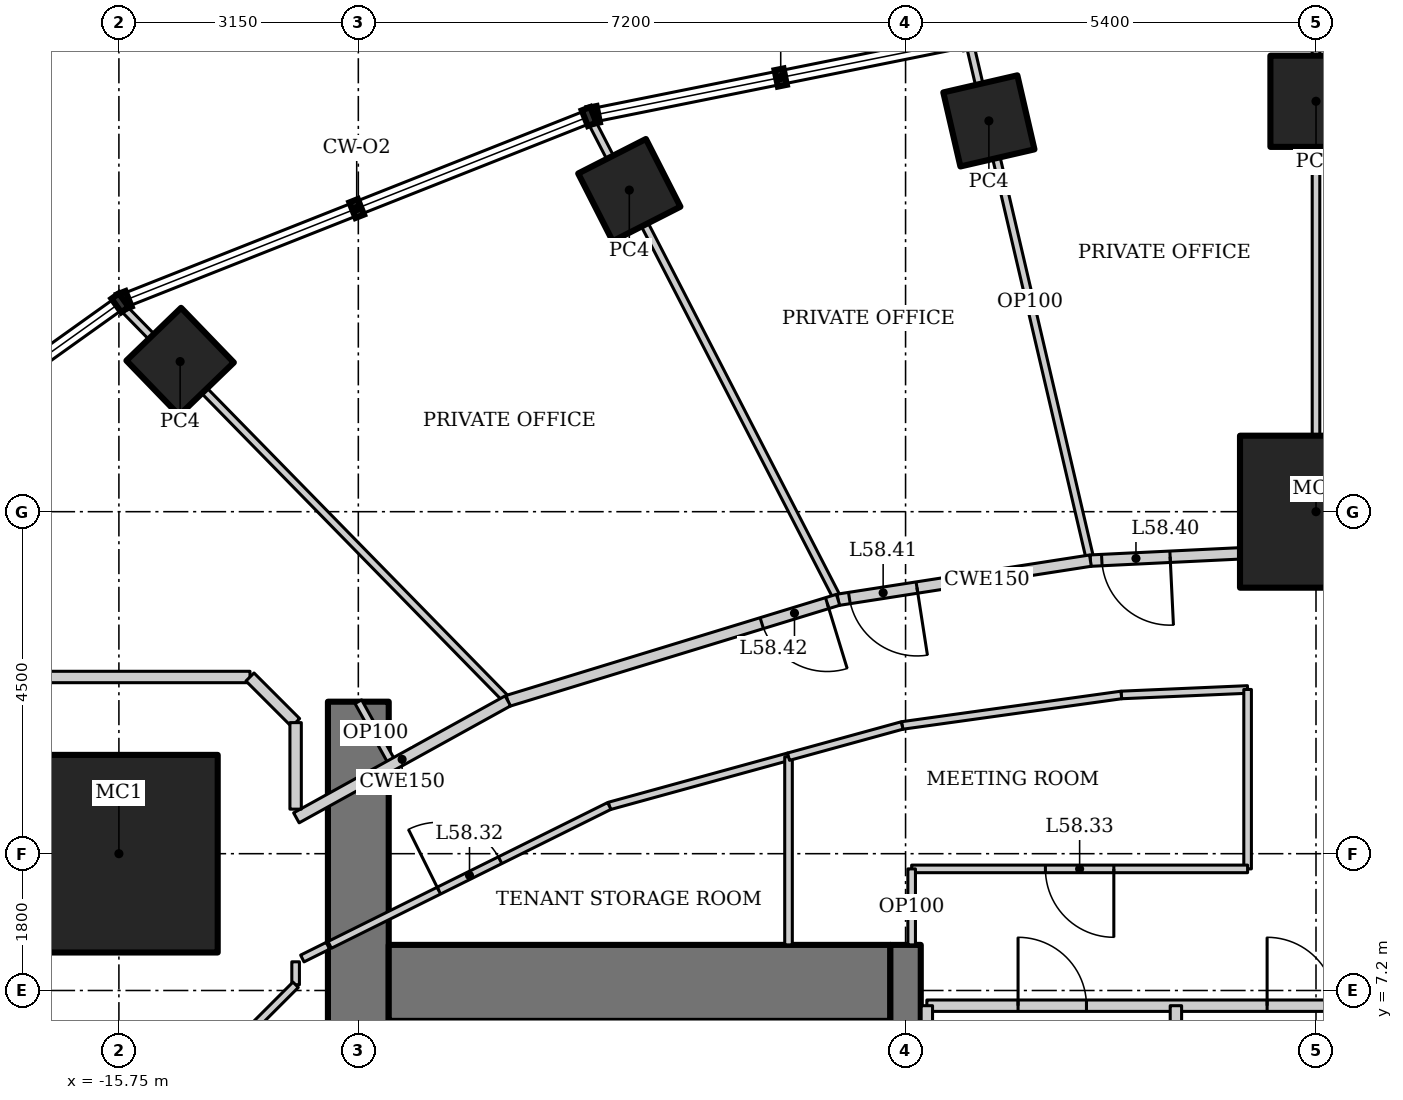
"""IFC4 building model, lengths in metres.
Left out: names, types, materials, properties, quantities, classifications, styles, units other than length and angle.
Written with IfcOpenShell. Run it as: python <this file> out.ifc"""

import sys

from ifc_helpers import new_model, si_unit, direction, frame, frame_2d, origin, origin_2d, place, context, subcontext, project, spatial, rectangle, hollow_rectangle, extrude, element, fill, save


model = new_model("IFC4")
c1 = context("Model", 3, precision=1e-05, world=origin(), true_north=direction((0.0, 1.0)))
c2 = subcontext(c1, "Body", "Model", "MODEL_VIEW")
j1 = project(units=[si_unit("LENGTHUNIT", "METRE"), si_unit("PLANEANGLEUNIT", "RADIAN")], contexts=[c1])
p1 = place(None, origin())
s1 = spatial("IfcSite", under=j1, at=p1, CompositionType="ELEMENT")
p2 = place(p1, origin())
s2 = spatial("IfcBuilding", under=s1, at=p2, CompositionType="ELEMENT")
p3 = place(p2, frame((0.0, 0.0, 249.4)))
s3 = spatial("IfcBuildingStorey", under=s2, at=p3, CompositionType="ELEMENT", Elevation=249.4)
p4 = place(p3, frame((0.0, 13.5, 0.0), z_axis=(0.0, 0.0, 1.0), x_axis=(1.0, 0.0, 0.0)))
e1 = element("IfcColumn", 1, at=p4, inside=s3, PredefinedType="COLUMN", context=c2, shape_type="SweptSolid", body=[
    extrude(hollow_rectangle(XDim=2.0, YDim=2.0, WallThickness=0.17, at=origin_2d()), origin(), (0.0, 0.0, 1.0), 4.2),
])
p5 = place(p3, frame((-15.75, 9.0, 0.0), z_axis=(0.0, 0.0, 1.0), x_axis=(1.0, 0.0, 0.0)))
e2 = element("IfcColumn", 2, at=p5, inside=s3, PredefinedType="COLUMN", context=c2, shape_type="SweptSolid", body=[
    extrude(hollow_rectangle(XDim=2.6, YDim=2.6, WallThickness=0.13, at=origin_2d()), origin(), (0.0, 0.0, 1.0), 4.2),
])
p6 = place(p3, frame((0.0, 18.9, 0.0), z_axis=(0.0, 0.0, 1.0), x_axis=(1.0, 0.0, 0.0)))
e3 = element("IfcColumn", 3, at=p6, inside=s3, PredefinedType="COLUMN", context=c2, shape_type="SweptSolid", body=[
    extrude(hollow_rectangle(XDim=1.2, YDim=1.2, WallThickness=0.1, at=origin_2d()), origin(), (0.0, 0.0, 1.0), 4.2),
])
for number, where, z_axis, x_axis in (
    (4, (-4.304, 18.642, 0.0), (0.0, 0.0, 1.0), (0.974, 0.225, 0.0)),
    (5, (-9.035, 17.731, 0.0), (0.0, 0.0, 1.0), (0.891, 0.454, 0.0)),
    (6, (-14.944, 15.475, 0.0), (0.0, 0.0, 1.0), (0.719, 0.695, 0.0)),
):
    element("IfcColumn", number, at=place(p3, frame(where, z_axis=z_axis, x_axis=x_axis)), inside=s3, PredefinedType="COLUMN", context=c2, shape_type="SweptSolid", body=[
        extrude(hollow_rectangle(XDim=1.0, YDim=1.0, WallThickness=0.08, at=origin_2d()), origin(), (0.0, 0.0, 1.0), 4.2),
    ])
p7 = place(p3, frame((-12.6, 11.0, 0.0), z_axis=(0.0, 0.0, 1.0), x_axis=(0.0, -1.0, 0.0)))
e7 = element("IfcWall", 7, at=p7, inside=s3, PredefinedType="SHEAR", context=c2, shape_type="SweptSolid", body=[
    extrude(rectangle(XDim=22.0, YDim=0.8, at=frame_2d((11.0, 0.0))), origin(), (0.0, 0.0, 1.0), 4.2),
])
p8 = place(p7, frame((10.1, 0.0, 0.0)))
e8 = element("IfcOpeningElement", 8, at=p8, cuts=e7, PredefinedType="OPENING", context=c2, shape_type="SweptSolid", body=[
    extrude(rectangle(XDim=1.8, YDim=2.1, at=frame_2d((0.9, 1.05))), frame((0.0, 0.41, 0.0), z_axis=(0.0, -1.0, 0.0), x_axis=(1.0, 0.0, 0.0)), (0.0, 0.0, 1.0), 0.82),
])
p9 = place(p3, frame((-5.6, 7.3, 0.0), z_axis=(0.0, 0.0, 1.0), x_axis=(-1.0, 0.0, 0.0)))
e9 = element("IfcWall", 9, at=p9, inside=s3, PredefinedType="SHEAR", context=c2, shape_type="SweptSolid", body=[
    extrude(rectangle(XDim=6.6, YDim=1.0, at=frame_2d((3.3, 0.0))), origin(), (0.0, 0.0, 1.0), 4.2),
])
p10 = place(p3, frame((-5.4, 7.8, 0.0), z_axis=(0.0, 0.0, 1.0), x_axis=(0.0, -1.0, 0.0)))
e10 = element("IfcWall", 10, at=p10, inside=s3, PredefinedType="SHEAR", context=c2, shape_type="SweptSolid", body=[
    extrude(rectangle(XDim=14.6, YDim=0.4, at=frame_2d((7.3, 0.0))), origin(), (0.0, 0.0, 1.0), 4.2),
])
p11 = place(p10, frame((6.4, 0.0, 0.0)))
e11 = element("IfcOpeningElement", 11, at=p11, cuts=e10, PredefinedType="OPENING", context=c2, shape_type="SweptSolid", body=[
    extrude(rectangle(XDim=1.8, YDim=2.1, at=frame_2d((0.9, 1.05))), frame((0.0, 0.21, 0.0), z_axis=(0.0, -1.0, 0.0), x_axis=(1.0, 0.0, 0.0)), (0.0, 0.0, 1.0), 0.42),
])
p12 = place(p3, frame((0.0, 19.945, 0.0), z_axis=(0.0, 0.0, 1.0), x_axis=(0.0, -1.0, 0.0)))
e12 = element("IfcWall", 12, at=p12, inside=s3, PredefinedType="PARTITIONING", context=c2, shape_type="SweptSolid", body=[
    extrude(rectangle(XDim=6.945, YDim=0.1, at=frame_2d((3.472, 0.0))), origin(), (0.0, 0.0, 1.0), 3.644),
])
p13 = place(p3, frame((-4.556, 19.657, 0.0), z_axis=(0.0, 0.0, 1.0), x_axis=(0.22733791689, -0.973815933092, 0.0)))
e13 = element("IfcWall", 13, at=p13, inside=s3, PredefinedType="PARTITIONING", context=c2, shape_type="SweptSolid", body=[
    extrude(rectangle(XDim=6.984, YDim=0.1, at=frame_2d((3.492, 0.0))), origin(), (0.0, 0.0, 1.0), 3.108),
])
p14 = place(p3, frame((-9.54, 18.65, 0.0), z_axis=(0.0, 0.0, 1.0), x_axis=(0.45810402165, -0.88889859115, 0.0)))
e14 = element("IfcWall", 14, at=p14, inside=s3, PredefinedType="PARTITIONING", context=c2, shape_type="SweptSolid", body=[
    extrude(rectangle(XDim=7.098, YDim=0.1, at=frame_2d((3.549, 0.0))), origin(), (0.0, 0.0, 1.0), 3.108),
])
p15 = place(p3, frame((-15.709, 16.199, 0.0), z_axis=(0.0, 0.0, 1.0), x_axis=(0.699362525935, -0.714767135029, 0.0)))
e15 = element("IfcWall", 15, at=p15, inside=s3, PredefinedType="PARTITIONING", context=c2, shape_type="SweptSolid", body=[
    extrude(rectangle(XDim=7.259, YDim=0.1, at=frame_2d((3.629, 0.0))), origin(), (0.0, 0.0, 1.0), 3.41),
])
p16 = place(p3, frame((2.968, 12.856, 0.0), z_axis=(0.0, 0.0, 1.0), x_axis=(-0.998824412818, 0.04847465687, 0.0)))
e16 = element("IfcWall", 16, at=p16, inside=s3, PredefinedType="PARTITIONING", context=c2, shape_type="SweptSolid", body=[
    extrude(rectangle(XDim=2.971, YDim=0.15, at=frame_2d((1.486, 0.0))), origin(), (0.0, 0.0, 1.0), 4.05),
])
p17 = place(p16, frame((0.15, 0.0, 0.0)))
e17 = element("IfcOpeningElement", 17, at=p17, cuts=e16, PredefinedType="OPENING", context=c2, shape_type="SweptSolid", body=[
    extrude(rectangle(XDim=0.9, YDim=2.1, at=frame_2d((0.45, 1.05))), frame((0.0, 0.085, 0.0), z_axis=(0.0, -1.0, 0.0), x_axis=(1.0, 0.0, 0.0)), (0.0, 0.0, 1.0), 0.17),
])
p18 = place(p3, frame((0.0, 13.0, 0.0), z_axis=(0.0, 0.0, 1.0), x_axis=(-0.998824412818, -0.04847465687, 0.0)))
e18 = element("IfcWall", 18, at=p18, inside=s3, PredefinedType="PARTITIONING", context=c2, shape_type="SweptSolid", body=[
    extrude(rectangle(XDim=2.971, YDim=0.15, at=frame_2d((1.486, 0.0))), origin(), (0.0, 0.0, 1.0), 4.05),
])
p19 = place(p18, frame((1.921, 0.0, 0.0)))
e19 = element("IfcOpeningElement", 19, at=p19, cuts=e18, PredefinedType="OPENING", context=c2, shape_type="SweptSolid", body=[
    extrude(rectangle(XDim=0.9, YDim=2.1, at=frame_2d((0.45, 1.05))), frame((0.0, 0.085, 0.0), z_axis=(0.0, -1.0, 0.0), x_axis=(1.0, 0.0, 0.0)), (0.0, 0.0, 1.0), 0.17),
])
p20 = place(p3, frame((-2.968, 12.856, 0.0), z_axis=(0.0, 0.0, 1.0), x_axis=(-0.988174283057, -0.153334882869, 0.0)))
e20 = element("IfcWall", 20, at=p20, inside=s3, PredefinedType="PARTITIONING", context=c2, shape_type="SweptSolid", body=[
    extrude(rectangle(XDim=3.36, YDim=0.15, at=frame_2d((1.68, 0.0))), origin(), (0.0, 0.0, 1.0), 4.05),
])
p21 = place(p20, frame((2.31, 0.0, 0.0)))
e21 = element("IfcOpeningElement", 21, at=p21, cuts=e20, PredefinedType="OPENING", context=c2, shape_type="SweptSolid", body=[
    extrude(rectangle(XDim=0.9, YDim=2.1, at=frame_2d((0.45, 1.05))), frame((0.0, 0.085, 0.0), z_axis=(0.0, -1.0, 0.0), x_axis=(1.0, 0.0, 0.0)), (0.0, 0.0, 1.0), 0.17),
])
p22 = place(p3, frame((-6.288, 12.341, 0.0), z_axis=(0.0, 0.0, 1.0), x_axis=(-0.956185837153, -0.292760388079, 0.0)))
e22 = element("IfcWall", 22, at=p22, inside=s3, PredefinedType="PARTITIONING", context=c2, shape_type="SweptSolid", body=[
    extrude(rectangle(XDim=4.544, YDim=0.15, at=frame_2d((2.272, 0.0))), origin(), (0.0, 0.0, 1.0), 4.05),
])
p23 = place(p22, frame((0.15, 0.0, 0.0)))
e23 = element("IfcOpeningElement", 23, at=p23, cuts=e22, PredefinedType="OPENING", context=c2, shape_type="SweptSolid", body=[
    extrude(rectangle(XDim=0.9, YDim=2.1, at=frame_2d((0.45, 1.05))), frame((0.0, 0.085, 0.0), z_axis=(0.0, -1.0, 0.0), x_axis=(1.0, 0.0, 0.0)), (0.0, 0.0, 1.0), 0.17),
])
p24 = place(p3, frame((-5.12, 7.0, 0.0), z_axis=(0.0, 0.0, 1.0), x_axis=(1.0, 0.0, 0.0)))
e24 = element("IfcWall", 24, at=p24, inside=s3, PredefinedType="SOLIDWALL", context=c2, shape_type="SweptSolid", body=[
    extrude(rectangle(XDim=10.24, YDim=0.15, at=frame_2d((5.12, 0.0))), origin(), (0.0, 0.0, 1.0), 4.05),
])
p25 = place(p24, frame((1.2, 0.0, 0.0)))
e25 = element("IfcOpeningElement", 25, at=p25, cuts=e24, PredefinedType="OPENING", context=c2, shape_type="SweptSolid", body=[
    extrude(rectangle(XDim=0.9, YDim=2.1, at=frame_2d((0.45, 1.05))), frame((0.0, 0.085, 0.0), z_axis=(0.0, -1.0, 0.0), x_axis=(1.0, 0.0, 0.0)), (0.0, 0.0, 1.0), 0.17),
])
p26 = place(p24, frame((4.477, 0.0, 0.0)))
e26 = element("IfcOpeningElement", 26, at=p26, cuts=e24, PredefinedType="OPENING", context=c2, shape_type="SweptSolid", body=[
    extrude(rectangle(XDim=0.9, YDim=2.1, at=frame_2d((0.45, 1.05))), frame((0.0, 0.085, 0.0), z_axis=(0.0, -1.0, 0.0), x_axis=(1.0, 0.0, 0.0)), (0.0, 0.0, 1.0), 0.17),
])
p27 = place(p24, frame((7.054, 0.0, 0.0)))
e27 = element("IfcOpeningElement", 27, at=p27, cuts=e24, PredefinedType="OPENING", context=c2, shape_type="SweptSolid", body=[
    extrude(rectangle(XDim=1.0, YDim=2.1, at=frame_2d((0.5, 1.05))), frame((0.0, 0.085, 0.0), z_axis=(0.0, -1.0, 0.0), x_axis=(1.0, 0.0, 0.0)), (0.0, 0.0, 1.0), 0.17),
])
p28 = place(p24, frame((8.952, 0.0, 0.0)))
e28 = element("IfcOpeningElement", 28, at=p28, cuts=e24, PredefinedType="OPENING", context=c2, shape_type="SweptSolid", body=[
    extrude(rectangle(XDim=0.9, YDim=2.1, at=frame_2d((0.45, 1.05))), frame((0.0, 0.085, 0.0), z_axis=(0.0, -1.0, 0.0), x_axis=(1.0, 0.0, 0.0)), (0.0, 0.0, 1.0), 0.17),
])
for number, where, z_axis, x_axis in (
    (29, (-5.12, 2.6, 0.0), (0.0, 0.0, 1.0), (0.0, 1.0, 0.0)),
    (30, (-1.843, 2.6, 0.0), (0.0, 0.0, 1.0), (0.0, 1.0, 0.0)),
):
    element("IfcWall", number, at=place(p3, frame(where, z_axis=z_axis, x_axis=x_axis)), inside=s3, PredefinedType="SOLIDWALL", context=c2, shape_type="SweptSolid", body=[
        extrude(rectangle(XDim=4.4, YDim=0.15, at=frame_2d((2.2, 0.0))), origin(), (0.0, 0.0, 1.0), 4.05),
    ])
p29 = place(p3, frame((-9.298, 9.628, 0.0), z_axis=(0.0, 0.0, 1.0), x_axis=(0.964255150805, 0.264975478385, 0.0)))
e31 = element("IfcWall", 31, at=p29, inside=s3, PredefinedType="PARTITIONING", context=c2, shape_type="SweptSolid", body=[
    extrude(rectangle(XDim=2.445, YDim=0.1, at=frame_2d((1.223, 0.0))), origin(), (0.0, 0.0, 1.0), 4.05),
])
p30 = place(p3, frame((-6.94, 10.276, 0.0), z_axis=(0.0, 0.0, 1.0), x_axis=(0.0, -1.0, 0.0)))
e32 = element("IfcWall", 32, at=p30, inside=s3, PredefinedType="PARTITIONING", context=c2, shape_type="SweptSolid", body=[
    extrude(rectangle(XDim=2.476, YDim=0.1, at=frame_2d((1.238, 0.0))), origin(), (0.0, 0.0, 1.0), 4.05),
])
p31 = place(p3, frame((-12.977, 7.8, 0.0), z_axis=(0.0, 0.0, 1.0), x_axis=(0.895529831139, 0.445001484874, 0.0)))
e33 = element("IfcWall", 33, at=p31, inside=s3, PredefinedType="PARTITIONING", context=c2, shape_type="SweptSolid", body=[
    extrude(rectangle(XDim=4.108, YDim=0.1, at=frame_2d((2.054, 0.0))), origin(), (0.0, 0.0, 1.0), 4.05),
])
p32 = place(p31, frame((1.604, 0.0, 0.0)))
e34 = element("IfcOpeningElement", 34, at=p32, cuts=e33, PredefinedType="OPENING", context=c2, shape_type="SweptSolid", body=[
    extrude(rectangle(XDim=0.9, YDim=2.1, at=frame_2d((0.45, 1.05))), frame((0.0, 0.06, 0.0), z_axis=(0.0, -1.0, 0.0), x_axis=(1.0, 0.0, 0.0)), (0.0, 0.0, 1.0), 0.12),
])
p33 = place(p3, frame((-5.445, 10.687, 0.0), z_axis=(0.0, 0.0, 1.0), x_axis=(0.99045099049, 0.137865280027, 0.0)))
e35 = element("IfcWall", 35, at=p33, inside=s3, PredefinedType="PARTITIONING", context=c2, shape_type="SweptSolid", body=[
    extrude(rectangle(XDim=2.913, YDim=0.1, at=frame_2d((1.457, 0.0))), origin(), (0.0, 0.0, 1.0), 4.05),
])
p34 = place(p3, frame((-2.56, 11.089, 0.0), z_axis=(0.0, 0.0, 1.0), x_axis=(0.999053939397, 0.043488230303, 0.0)))
e36 = element("IfcWall", 36, at=p34, inside=s3, PredefinedType="PARTITIONING", context=c2, shape_type="SweptSolid", body=[
    extrude(rectangle(XDim=1.662, YDim=0.1, at=frame_2d((0.831, 0.0))), origin(), (0.0, 0.0, 1.0), 4.05),
])
p35 = place(p3, frame((-0.9, 11.161, 0.0), z_axis=(0.0, 0.0, 1.0), x_axis=(0.0, -1.0, 0.0)))
e37 = element("IfcWall", 37, at=p35, inside=s3, PredefinedType="PARTITIONING", context=c2, shape_type="SweptSolid", body=[
    extrude(rectangle(XDim=2.361, YDim=0.1, at=frame_2d((1.18, 0.0))), origin(), (0.0, 0.0, 1.0), 4.05),
])
p36 = place(p3, frame((-0.9, 8.8, 0.0), z_axis=(0.0, 0.0, 1.0), x_axis=(-1.0, 0.0, 0.0)))
e38 = element("IfcWall", 38, at=p36, inside=s3, PredefinedType="PARTITIONING", context=c2, shape_type="SweptSolid", body=[
    extrude(rectangle(XDim=4.42, YDim=0.1, at=frame_2d((2.21, 0.0))), origin(), (0.0, 0.0, 1.0), 4.05),
])
p37 = place(p36, frame((1.76, 0.0, 0.0)))
e39 = element("IfcOpeningElement", 39, at=p37, cuts=e38, PredefinedType="OPENING", context=c2, shape_type="SweptSolid", body=[
    extrude(rectangle(XDim=0.9, YDim=2.1, at=frame_2d((0.45, 1.05))), frame((0.0, 0.06, 0.0), z_axis=(0.0, -1.0, 0.0), x_axis=(1.0, 0.0, 0.0)), (0.0, 0.0, 1.0), 0.12),
])
p38 = place(p3, frame((-5.32, 8.8, 0.0), z_axis=(0.0, 0.0, 1.0), x_axis=(0.0, -1.0, 0.0)))
e40 = element("IfcWall", 40, at=p38, inside=s3, PredefinedType="PARTITIONING", context=c2, shape_type="SweptSolid", body=[
    extrude(rectangle(XDim=1.0, YDim=0.1, at=frame_2d((0.5, 0.0))), origin(), (0.0, 0.0, 1.0), 4.05),
])
p39 = place(p3, frame((-6.94, 10.276, 0.0), z_axis=(0.0, 0.0, 1.0), x_axis=(0.964227536736, 0.265075946476, 0.0)))
e41 = element("IfcWall", 41, at=p39, inside=s3, PredefinedType="PARTITIONING", context=c2, shape_type="SweptSolid", body=[
    extrude(rectangle(XDim=1.55, YDim=0.1, at=frame_2d((0.775, 0.0))), origin(), (0.0, 0.0, 1.0), 4.05),
])
p40 = place(p3, frame((-13.337, 7.621, 0.0), z_axis=(0.0, 0.0, 1.0), x_axis=(0.895721570004, 0.444615416995, 0.0)))
e42 = element("IfcWall", 42, at=p40, inside=s3, PredefinedType="PARTITIONING", context=c2, shape_type="SweptSolid", body=[
    extrude(rectangle(XDim=0.376, YDim=0.1, at=frame_2d((0.188, 0.0))), origin(), (0.0, 0.0, 1.0), 4.05),
])
p41 = place(p3, frame((-12.6, 11.0, 0.0), z_axis=(0.0, 0.0, 1.0), x_axis=(0.484103558985, -0.875010710893, 0.0)))
e43 = element("IfcWall", 43, at=p41, inside=s3, PredefinedType="PARTITIONING", context=c2, shape_type="SweptSolid", body=[
    extrude(rectangle(XDim=0.943, YDim=0.1, at=frame_2d((0.472, 0.0))), origin(), (0.0, 0.0, 1.0), 4.05),
])
p42 = place(p3, frame((-10.633, 11.01, 0.0), z_axis=(0.0, 0.0, 1.0), x_axis=(-0.875072100837, -0.483992580869, 0.0)))
e44 = element("IfcWall", 44, at=p42, inside=s3, PredefinedType="PARTITIONING", context=c2, shape_type="SweptSolid", body=[
    extrude(rectangle(XDim=3.179, YDim=0.15, at=frame_2d((1.59, 0.0))), origin(), (0.0, 0.0, 1.0), 4.05),
])
p43 = place(p3, frame((-13.425, 7.578, 0.0), z_axis=(0.0, 0.0, 1.0), x_axis=(0.0, -1.0, 0.0)))
e45 = element("IfcWall", 45, at=p43, inside=s3, PredefinedType="PARTITIONING", context=c2, shape_type="SweptSolid", body=[
    extrude(rectangle(XDim=0.302, YDim=0.1, at=frame_2d((0.151, 0.0))), origin(), (0.0, 0.0, 1.0), 4.05),
])
p44 = place(p3, frame((-13.425, 7.275, 0.0), z_axis=(0.0, 0.0, 1.0), x_axis=(-0.707106781187, -0.707106781187, 0.0)))
e46 = element("IfcWall", 46, at=p44, inside=s3, PredefinedType="PARTITIONING", context=c2, shape_type="SweptSolid", body=[
    extrude(rectangle(XDim=0.849, YDim=0.1, at=frame_2d((0.425, 0.0))), origin(), (0.0, 0.0, 1.0), 4.05),
])
p45 = place(p3, frame((-17.475, 11.325, 0.0), z_axis=(0.0, 0.0, 1.0), x_axis=(1.0, 0.0, 0.0)))
e47 = element("IfcWall", 47, at=p45, inside=s3, PredefinedType="PARTITIONING", context=c2, shape_type="SweptSolid", body=[
    extrude(rectangle(XDim=3.449, YDim=0.15, at=frame_2d((1.725, 0.0))), origin(), (0.0, 0.0, 1.0), 4.05),
])
p46 = place(p3, frame((-14.025, 11.325, 0.0), z_axis=(0.0, 0.0, 1.0), x_axis=(0.707106781187, -0.707106781187, 0.0)))
e48 = element("IfcWall", 48, at=p46, inside=s3, PredefinedType="PARTITIONING", context=c2, shape_type="SweptSolid", body=[
    extrude(rectangle(XDim=0.849, YDim=0.15, at=frame_2d((0.425, 0.0))), origin(), (0.0, 0.0, 1.0), 4.05),
])
p47 = place(p3, frame((-13.425, 10.725, 0.0), z_axis=(0.0, 0.0, 1.0), x_axis=(0.0, -1.0, 0.0)))
e49 = element("IfcWall", 49, at=p47, inside=s3, PredefinedType="PARTITIONING", context=c2, shape_type="SweptSolid", body=[
    extrude(rectangle(XDim=1.138, YDim=0.15, at=frame_2d((0.569, 0.0))), origin(), (0.0, 0.0, 1.0), 4.05),
])
p48 = place(p25, origin())
e50 = element("IfcDoor", 50, at=p48, inside=s3, OperationType="SINGLE_SWING_LEFT", PredefinedType="DOOR", context=c2, shape_type="SweptSolid", body=[
    extrude(rectangle(XDim=0.9, YDim=2.1, at=frame_2d((0.45, 1.05))), frame((0.0, 0.025, 0.0), z_axis=(0.0, -1.0, 0.0), x_axis=(1.0, 0.0, 0.0)), (0.0, 0.0, 1.0), 0.05),
])
fill(e25, e50)
p49 = place(p26, origin())
e51 = element("IfcDoor", 51, at=p49, inside=s3, OperationType="SINGLE_SWING_LEFT", PredefinedType="DOOR", context=c2, shape_type="SweptSolid", body=[
    extrude(rectangle(XDim=0.9, YDim=2.1, at=frame_2d((0.45, 1.05))), frame((0.0, 0.025, 0.0), z_axis=(0.0, -1.0, 0.0), x_axis=(1.0, 0.0, 0.0)), (0.0, 0.0, 1.0), 0.05),
])
fill(e26, e51)
p50 = place(p32, origin())
e52 = element("IfcDoor", 52, at=p50, inside=s3, OperationType="SINGLE_SWING_LEFT", PredefinedType="DOOR", context=c2, shape_type="SweptSolid", body=[
    extrude(rectangle(XDim=0.9, YDim=2.1, at=frame_2d((0.45, 1.05))), frame((0.0, 0.025, 0.0), z_axis=(0.0, -1.0, 0.0), x_axis=(1.0, 0.0, 0.0)), (0.0, 0.0, 1.0), 0.05),
])
fill(e34, e52)
p51 = place(p37, origin())
e53 = element("IfcDoor", 53, at=p51, inside=s3, OperationType="SINGLE_SWING_LEFT", PredefinedType="DOOR", context=c2, shape_type="SweptSolid", body=[
    extrude(rectangle(XDim=0.9, YDim=2.1, at=frame_2d((0.45, 1.05))), frame((0.0, 0.025, 0.0), z_axis=(0.0, -1.0, 0.0), x_axis=(1.0, 0.0, 0.0)), (0.0, 0.0, 1.0), 0.05),
])
fill(e39, e53)
p52 = place(p19, origin())
e54 = element("IfcDoor", 54, at=p52, inside=s3, OperationType="SINGLE_SWING_LEFT", PredefinedType="DOOR", context=c2, shape_type="SweptSolid", body=[
    extrude(rectangle(XDim=0.9, YDim=2.1, at=frame_2d((0.45, 1.05))), frame((0.0, 0.025, 0.0), z_axis=(0.0, -1.0, 0.0), x_axis=(1.0, 0.0, 0.0)), (0.0, 0.0, 1.0), 0.05),
])
fill(e19, e54)
p53 = place(p21, origin())
e55 = element("IfcDoor", 55, at=p53, inside=s3, OperationType="SINGLE_SWING_LEFT", PredefinedType="DOOR", context=c2, shape_type="SweptSolid", body=[
    extrude(rectangle(XDim=0.9, YDim=2.1, at=frame_2d((0.45, 1.05))), frame((0.0, 0.025, 0.0), z_axis=(0.0, -1.0, 0.0), x_axis=(1.0, 0.0, 0.0)), (0.0, 0.0, 1.0), 0.05),
])
fill(e21, e55)
p54 = place(p23, origin())
e56 = element("IfcDoor", 56, at=p54, inside=s3, OperationType="SINGLE_SWING_LEFT", PredefinedType="DOOR", context=c2, shape_type="SweptSolid", body=[
    extrude(rectangle(XDim=0.9, YDim=2.1, at=frame_2d((0.45, 1.05))), frame((0.0, 0.025, 0.0), z_axis=(0.0, -1.0, 0.0), x_axis=(1.0, 0.0, 0.0)), (0.0, 0.0, 1.0), 0.05),
])
fill(e23, e56)
save(model, sys.argv[1])
